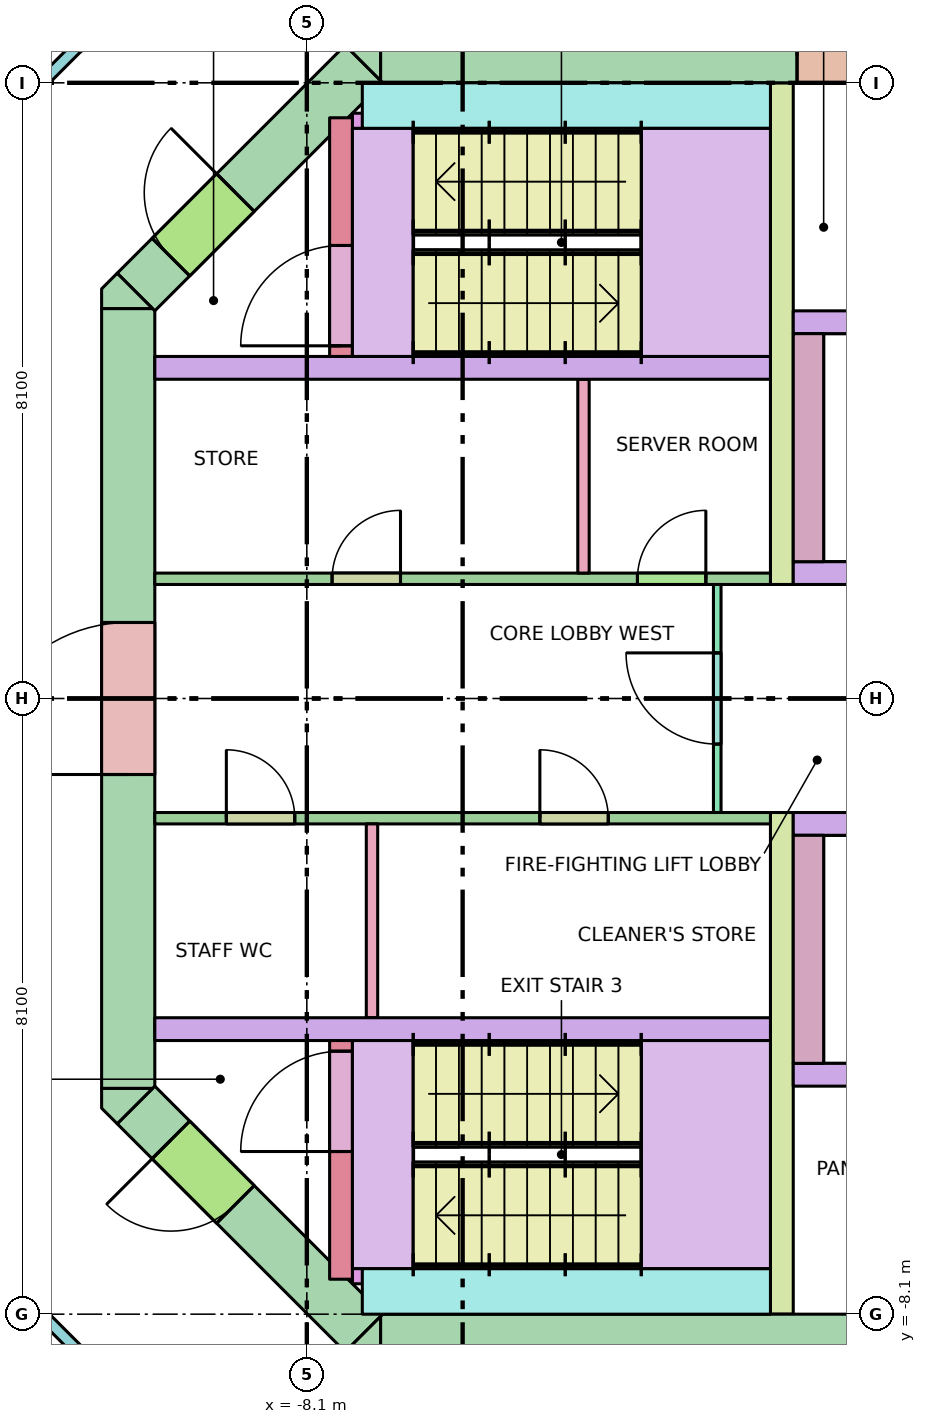
"""IFC4 building model, lengths in metres.
Left out: names, types, materials, properties, quantities, classifications, styles, units other than length and angle.
Written with IfcOpenShell. Run it as: python <this file> out.ifc"""

import sys

from ifc_helpers import new_model, si_unit, direction, frame, frame_2d, origin, place, context, subcontext, project, spatial, polyline, rectangle, outline, extrude, element, fill, save


model = new_model("IFC4")
c1 = context("Model", 3, precision=1e-05, world=origin(), true_north=direction((0.0, 1.0)))
c2 = subcontext(c1, "Body", "Model", "MODEL_VIEW")
j1 = project(units=[si_unit("LENGTHUNIT", "METRE"), si_unit("PLANEANGLEUNIT", "RADIAN")], contexts=[c1])
p1 = place(None, origin())
s1 = spatial("IfcSite", under=j1, at=p1, CompositionType="ELEMENT")
p2 = place(p1, origin())
s2 = spatial("IfcBuilding", under=s1, at=p2, CompositionType="ELEMENT")
p3 = place(p2, frame((0.0, 0.0, 218.7)))
s3 = spatial("IfcBuildingStorey", under=s2, at=p3, CompositionType="ELEMENT", Elevation=218.7)
p4 = place(p3, frame((-7.13, 8.45, -0.28), z_axis=(0.0, 0.0, 1.0), x_axis=(1.0, 0.0, 0.0)))
e1 = element("IfcWall", 1, at=p4, inside=s3, PredefinedType="SHEAR", context=c2, shape_type="SweptSolid", body=[
    extrude(rectangle(XDim=14.26, YDim=0.7, at=frame_2d((7.13, 0.0))), origin(), (0.0, 0.0, 1.0), 7.4),
])
p5 = place(p4, frame((5.48, 0.0, 0.28)))
e2 = element("IfcOpeningElement", 2, at=p5, cuts=e1, PredefinedType="OPENING", context=c2, shape_type="SweptSolid", body=[
    extrude(rectangle(XDim=0.7, YDim=2.1, at=frame_2d((0.35, 1.05))), frame((0.0, 0.36, 0.0), z_axis=(0.0, -1.0, 0.0), x_axis=(1.0, 0.0, 0.0)), (0.0, 0.0, 1.0), 0.72),
])
p6 = place(p4, frame((7.155, 0.0, 0.28)))
e3 = element("IfcOpeningElement", 3, at=p6, cuts=e1, PredefinedType="OPENING", context=c2, shape_type="SweptSolid", body=[
    extrude(rectangle(XDim=0.9, YDim=2.1, at=frame_2d((0.45, 1.05))), frame((0.0, 0.36, 0.0), z_axis=(0.0, -1.0, 0.0), x_axis=(1.0, 0.0, 0.0)), (0.0, 0.0, 1.0), 0.72),
])
p7 = place(p3, frame((-7.13, -8.45, -0.28), z_axis=(0.0, 0.0, 1.0), x_axis=(1.0, 0.0, 0.0)))
e4 = element("IfcWall", 4, at=p7, inside=s3, PredefinedType="SHEAR", context=c2, shape_type="SweptSolid", body=[
    extrude(rectangle(XDim=14.26, YDim=0.7, at=frame_2d((7.13, 0.0))), origin(), (0.0, 0.0, 1.0), 7.4),
])
p8 = place(p7, frame((8.08, 0.0, 0.28)))
e5 = element("IfcOpeningElement", 5, at=p8, cuts=e4, PredefinedType="OPENING", context=c2, shape_type="SweptSolid", body=[
    extrude(rectangle(XDim=0.7, YDim=2.1, at=frame_2d((0.35, 1.05))), frame((0.0, 0.36, 0.0), z_axis=(0.0, -1.0, 0.0), x_axis=(1.0, 0.0, 0.0)), (0.0, 0.0, 1.0), 0.72),
])
p9 = place(p7, frame((6.205, 0.0, 0.28)))
e6 = element("IfcOpeningElement", 6, at=p9, cuts=e4, PredefinedType="OPENING", context=c2, shape_type="SweptSolid", body=[
    extrude(rectangle(XDim=0.9, YDim=2.1, at=frame_2d((0.45, 1.05))), frame((0.0, 0.36, 0.0), z_axis=(0.0, -1.0, 0.0), x_axis=(1.0, 0.0, 0.0)), (0.0, 0.0, 1.0), 0.72),
])
p10 = place(p7, frame((10.667, 0.0, 0.28)))
e7 = element("IfcOpeningElement", 7, at=p10, cuts=e4, PredefinedType="OPENING", context=c2, shape_type="SweptSolid", body=[
    extrude(rectangle(XDim=0.9, YDim=2.1, at=frame_2d((0.45, 1.05))), frame((0.0, 0.36, 0.0), z_axis=(0.0, -1.0, 0.0), x_axis=(1.0, 0.0, 0.0)), (0.0, 0.0, 1.0), 0.72),
])
p11 = place(p3, frame((-10.45, -5.13, -0.28), z_axis=(0.0, 0.0, 1.0), x_axis=(0.0, 1.0, 0.0)))
e8 = element("IfcWall", 8, at=p11, inside=s3, PredefinedType="SHEAR", context=c2, shape_type="SweptSolid", body=[
    extrude(rectangle(XDim=10.26, YDim=0.7, at=frame_2d((5.13, 0.0))), origin(), (0.0, 0.0, 1.0), 7.4),
])
p12 = place(p11, frame((4.13, 0.0, 0.28)))
e9 = element("IfcOpeningElement", 9, at=p12, cuts=e8, PredefinedType="OPENING", context=c2, shape_type="SweptSolid", body=[
    extrude(rectangle(XDim=2.0, YDim=2.1, at=frame_2d((1.0, 1.05))), frame((0.0, 0.36, 0.0), z_axis=(0.0, -1.0, 0.0), x_axis=(1.0, 0.0, 0.0)), (0.0, 0.0, 1.0), 0.72),
])
p13 = place(p3, frame((-10.347, 5.347, -0.28), z_axis=(0.0, 0.0, 1.0), x_axis=(0.707106781187, 0.707106781187, 0.0)))
e10 = element("IfcWall", 10, at=p13, inside=s3, PredefinedType="SHEAR", context=c2, shape_type="SweptSolid", body=[
    extrude(rectangle(XDim=4.243, YDim=0.7, at=frame_2d((2.121, 0.0))), origin(), (0.0, 0.0, 1.0), 7.4),
])
p14 = place(p13, frame((0.65, 0.0, 0.28)))
e11 = element("IfcOpeningElement", 11, at=p14, cuts=e10, PredefinedType="OPENING", context=c2, shape_type="SweptSolid", body=[
    extrude(rectangle(XDim=1.2, YDim=2.1, at=frame_2d((0.6, 1.05))), frame((0.0, 0.36, 0.0), z_axis=(0.0, -1.0, 0.0), x_axis=(1.0, 0.0, 0.0)), (0.0, 0.0, 1.0), 0.72),
])
p15 = place(p3, frame((-7.347, -8.347, -0.28), z_axis=(0.0, 0.0, 1.0), x_axis=(-0.707106781187, 0.707106781187, 0.0)))
e12 = element("IfcWall", 12, at=p15, inside=s3, PredefinedType="SHEAR", context=c2, shape_type="SweptSolid", body=[
    extrude(rectangle(XDim=4.243, YDim=0.7, at=frame_2d((2.121, 0.0))), origin(), (0.0, 0.0, 1.0), 7.4),
])
p16 = place(p15, frame((2.393, 0.0, 0.28)))
e13 = element("IfcOpeningElement", 13, at=p16, cuts=e12, PredefinedType="OPENING", context=c2, shape_type="SweptSolid", body=[
    extrude(rectangle(XDim=1.2, YDim=2.1, at=frame_2d((0.6, 1.05))), frame((0.0, 0.36, 0.0), z_axis=(0.0, -1.0, 0.0), x_axis=(1.0, 0.0, 0.0)), (0.0, 0.0, 1.0), 0.72),
])
p17 = place(p3, frame((0.0, 0.0, -0.28)))
e14 = element("IfcWall", 14, at=p17, inside=s3, PredefinedType="SHEAR", context=c2, shape_type="SweptSolid", body=[
    extrude(outline(polyline([(-7.39, -8.8), (-7.595, -8.595), (-7.595, -8.595), (-7.595, -8.595), (-7.13, -8.13), (-7.13, -8.8), (-7.13, -8.8), (-7.39, -8.8)])), origin(), (0.0, 0.0, 1.0), 7.4),
])
p18 = place(p3, frame((0.0, 0.0, -0.28)))
e15 = element("IfcWall", 15, at=p18, inside=s3, PredefinedType="SHEAR", context=c2, shape_type="SweptSolid", body=[
    extrude(outline(polyline([(-10.8, -5.39), (-10.8, -5.13), (-10.8, -5.13), (-10.13, -5.13), (-10.595, -5.595), (-10.595, -5.595), (-10.595, -5.595), (-10.8, -5.39)])), origin(), (0.0, 0.0, 1.0), 7.4),
])
p19 = place(p3, frame((0.0, 0.0, -0.28)))
e16 = element("IfcWall", 16, at=p19, inside=s3, PredefinedType="SHEAR", context=c2, shape_type="SweptSolid", body=[
    extrude(outline(polyline([(-10.595, 5.595), (-10.595, 5.595), (-10.595, 5.595), (-10.13, 5.13), (-10.8, 5.13), (-10.8, 5.13), (-10.8, 5.39), (-10.595, 5.595)])), origin(), (0.0, 0.0, 1.0), 7.4),
])
p20 = place(p3, frame((0.0, 0.0, -0.28)))
e17 = element("IfcWall", 17, at=p20, inside=s3, PredefinedType="SHEAR", context=c2, shape_type="SweptSolid", body=[
    extrude(outline(polyline([(-7.39, 8.8), (-7.13, 8.8), (-7.13, 8.8), (-7.13, 8.13), (-7.595, 8.595), (-7.595, 8.595), (-7.595, 8.595), (-7.39, 8.8)])), origin(), (0.0, 0.0, 1.0), 7.4),
])
for number, where, z_axis, x_axis in (
    (18, (-10.1, 4.35, 0.0), (0.0, 0.0, 1.0), (1.0, 0.0, 0.0)),
    (19, (-10.1, -4.35, 0.0), (0.0, 0.0, 1.0), (1.0, 0.0, 0.0)),
):
    element("IfcWall", number, at=place(p3, frame(where, z_axis=z_axis, x_axis=x_axis)), inside=s3, PredefinedType="SOLIDWALL", context=c2, shape_type="SweptSolid", body=[
        extrude(rectangle(XDim=8.1, YDim=0.3, at=frame_2d((4.05, 0.0))), origin(), (0.0, 0.0, 1.0), 7.12),
    ])
for number, where, z_axis, x_axis in (
    (20, (-1.85, 1.5, 0.0), (0.0, 0.0, 1.0), (0.0, 1.0, 0.0)),
    (21, (-1.85, -8.1, 0.0), (0.0, 0.0, 1.0), (0.0, 1.0, 0.0)),
):
    element("IfcWall", number, at=place(p3, frame(where, z_axis=z_axis, x_axis=x_axis)), inside=s3, PredefinedType="SHEAR", context=c2, shape_type="SweptSolid", body=[
        extrude(rectangle(XDim=6.6, YDim=0.3, at=frame_2d((3.3, 0.0))), origin(), (0.0, 0.0, 1.0), 7.12),
    ])
p21 = place(p3, frame((-1.7, 1.65, 0.0), z_axis=(0.0, 0.0, 1.0), x_axis=(1.0, 0.0, 0.0)))
e22 = element("IfcWall", 22, at=p21, inside=s3, PredefinedType="SOLIDWALL", context=c2, shape_type="SweptSolid", body=[
    extrude(rectangle(XDim=3.4, YDim=0.3, at=frame_2d((1.7, 0.0))), origin(), (0.0, 0.0, 1.0), 7.12),
])
p22 = place(p21, frame((1.15, 0.0, 0.0)))
e23 = element("IfcOpeningElement", 23, at=p22, cuts=e22, PredefinedType="OPENING", context=c2, shape_type="SweptSolid", body=[
    extrude(rectangle(XDim=1.1, YDim=2.1, at=frame_2d((0.55, 1.05))), frame((0.0, 0.16, 0.0), z_axis=(0.0, -1.0, 0.0), x_axis=(1.0, 0.0, 0.0)), (0.0, 0.0, 1.0), 0.32),
])
p23 = place(p3, frame((-1.7, -1.65, 0.0), z_axis=(0.0, 0.0, 1.0), x_axis=(1.0, 0.0, 0.0)))
e24 = element("IfcWall", 24, at=p23, inside=s3, PredefinedType="SOLIDWALL", context=c2, shape_type="SweptSolid", body=[
    extrude(rectangle(XDim=3.4, YDim=0.3, at=frame_2d((1.7, 0.0))), origin(), (0.0, 0.0, 1.0), 7.12),
])
p24 = place(p23, frame((1.15, 0.0, 0.0)))
e25 = element("IfcOpeningElement", 25, at=p24, cuts=e24, PredefinedType="OPENING", context=c2, shape_type="SweptSolid", body=[
    extrude(rectangle(XDim=1.1, YDim=2.1, at=frame_2d((0.55, 1.05))), frame((0.0, 0.16, 0.0), z_axis=(0.0, -1.0, 0.0), x_axis=(1.0, 0.0, 0.0)), (0.0, 0.0, 1.0), 0.32),
])
for number, where, z_axis, x_axis in (
    (26, (-1.5, 1.8, 0.0), (0.0, 0.0, 1.0), (0.0, 1.0, 0.0)),
    (27, (-1.5, -4.8, 0.0), (0.0, 0.0, 1.0), (0.0, 1.0, 0.0)),
):
    element("IfcWall", number, at=place(p3, frame(where, z_axis=z_axis, x_axis=x_axis)), inside=s3, PredefinedType="SOLIDWALL", context=c2, shape_type="SweptSolid", body=[
        extrude(rectangle(XDim=3.0, YDim=0.4, at=frame_2d((1.5, 0.0))), origin(), (0.0, 0.0, 1.0), 7.12),
    ])
for number, where, z_axis, x_axis in (
    (28, (-1.7, 4.95, 0.0), (0.0, 0.0, 1.0), (1.0, 0.0, 0.0)),
    (29, (-1.7, -4.95, 0.0), (0.0, 0.0, 1.0), (1.0, 0.0, 0.0)),
):
    element("IfcWall", number, at=place(p3, frame(where, z_axis=z_axis, x_axis=x_axis)), inside=s3, PredefinedType="SOLIDWALL", context=c2, shape_type="SweptSolid", body=[
        extrude(rectangle(XDim=3.4, YDim=0.3, at=frame_2d((1.7, 0.0))), origin(), (0.0, 0.0, 1.0), 7.12),
    ])
p25 = place(p3, frame((-7.65, 4.5, 0.0), z_axis=(0.0, 0.0, 1.0), x_axis=(0.0, 1.0, 0.0)))
e30 = element("IfcWall", 30, at=p25, inside=s3, PredefinedType="SHEAR", context=c2, shape_type="SweptSolid", body=[
    extrude(rectangle(XDim=3.14, YDim=0.3, at=frame_2d((1.57, 0.0))), origin(), (0.0, 0.0, 1.0), 7.12),
])
p26 = place(p25, frame((0.14, 0.0, 0.0)))
e31 = element("IfcOpeningElement", 31, at=p26, cuts=e30, PredefinedType="OPENING", context=c2, shape_type="SweptSolid", body=[
    extrude(rectangle(XDim=1.32, YDim=2.1, at=frame_2d((0.66, 1.05))), frame((0.0, 0.16, 0.0), z_axis=(0.0, -1.0, 0.0), x_axis=(1.0, 0.0, 0.0)), (0.0, 0.0, 1.0), 0.32),
])
p27 = place(p3, frame((-7.37, 7.8, 0.0), z_axis=(0.0, 0.0, 1.0), x_axis=(1.0, 0.0, 0.0)))
e32 = element("IfcWall", 32, at=p27, inside=s3, PredefinedType="SHEAR", context=c2, shape_type="SweptSolid", body=[
    extrude(rectangle(XDim=5.37, YDim=0.6, at=frame_2d((2.685, 0.0))), origin(), (0.0, 0.0, 1.0), 7.12),
])
p28 = place(p3, frame((-7.65, -7.64, 0.0), z_axis=(0.0, 0.0, 1.0), x_axis=(0.0, 1.0, 0.0)))
e33 = element("IfcWall", 33, at=p28, inside=s3, PredefinedType="SHEAR", context=c2, shape_type="SweptSolid", body=[
    extrude(rectangle(XDim=3.14, YDim=0.3, at=frame_2d((1.57, 0.0))), origin(), (0.0, 0.0, 1.0), 7.12),
])
p29 = place(p28, frame((1.68, 0.0, 0.0)))
e34 = element("IfcOpeningElement", 34, at=p29, cuts=e33, PredefinedType="OPENING", context=c2, shape_type="SweptSolid", body=[
    extrude(rectangle(XDim=1.32, YDim=2.1, at=frame_2d((0.66, 1.05))), frame((0.0, 0.16, 0.0), z_axis=(0.0, -1.0, 0.0), x_axis=(1.0, 0.0, 0.0)), (0.0, 0.0, 1.0), 0.32),
])
for number, where, z_axis, x_axis in (
    (35, (-7.5, 7.6, 0.0), (0.0, 0.0, 1.0), (1.0, 0.0, 0.0)),
    (36, (-7.5, -7.6, 0.0), (0.0, 0.0, 1.0), (1.0, 0.0, 0.0)),
):
    element("IfcWall", number, at=place(p3, frame(where, z_axis=z_axis, x_axis=x_axis)), inside=s3, PredefinedType="SHEAR", context=c2, shape_type="SweptSolid", body=[
        extrude(rectangle(XDim=0.6, YDim=0.2, at=frame_2d((0.3, 0.0))), origin(), (0.0, 0.0, 1.0), 7.12),
    ])
p30 = place(p3, frame((-7.37, -7.8, 0.0), z_axis=(0.0, 0.0, 1.0), x_axis=(1.0, 0.0, 0.0)))
e37 = element("IfcWall", 37, at=p30, inside=s3, PredefinedType="SHEAR", context=c2, shape_type="SweptSolid", body=[
    extrude(rectangle(XDim=5.37, YDim=0.6, at=frame_2d((2.685, 0.0))), origin(), (0.0, 0.0, 1.0), 7.12),
])
p31 = place(p3, frame((-2.7, -1.5, 0.0), z_axis=(0.0, 0.0, 1.0), x_axis=(0.0, 1.0, 0.0)))
e38 = element("IfcWall", 38, at=p31, inside=s3, PredefinedType="PARTITIONING", context=c2, shape_type="SweptSolid", body=[
    extrude(rectangle(XDim=3.0, YDim=0.1, at=frame_2d((1.5, 0.0))), origin(), (0.0, 0.0, 1.0), 7.12),
])
p32 = place(p31, frame((0.9, 0.0, 0.0)))
e39 = element("IfcOpeningElement", 39, at=p32, cuts=e38, PredefinedType="OPENING", context=c2, shape_type="SweptSolid", body=[
    extrude(rectangle(XDim=1.2, YDim=2.1, at=frame_2d((0.6, 1.05))), frame((0.0, 0.06, 0.0), z_axis=(0.0, -1.0, 0.0), x_axis=(1.0, 0.0, 0.0)), (0.0, 0.0, 1.0), 0.12),
])
for number, where, z_axis, x_axis in (
    (40, (-4.46, 1.65, 0.0), (0.0, 0.0, 1.0), (0.0, 1.0, 0.0)),
    (41, (-7.242, -4.2, 0.0), (0.0, 0.0, 1.0), (0.0, 1.0, 0.0)),
):
    element("IfcWall", number, at=place(p3, frame(where, z_axis=z_axis, x_axis=x_axis)), inside=s3, PredefinedType="PARTITIONING", context=c2, shape_type="SweptSolid", body=[
        extrude(rectangle(XDim=2.55, YDim=0.15, at=frame_2d((1.275, 0.0))), origin(), (0.0, 0.0, 1.0), 7.12),
    ])
p33 = place(p3, frame((-10.1, 1.575, 0.0), z_axis=(0.0, 0.0, 1.0), x_axis=(1.0, 0.0, 0.0)))
e42 = element("IfcWall", 42, at=p33, inside=s3, PredefinedType="PARTITIONING", context=c2, shape_type="SweptSolid", body=[
    extrude(rectangle(XDim=8.1, YDim=0.15, at=frame_2d((4.05, 0.0))), origin(), (0.0, 0.0, 1.0), 7.12),
])
p34 = place(p33, frame((2.333, 0.0, 0.0)))
e43 = element("IfcOpeningElement", 43, at=p34, cuts=e42, PredefinedType="OPENING", context=c2, shape_type="SweptSolid", body=[
    extrude(rectangle(XDim=0.9, YDim=2.1, at=frame_2d((0.45, 1.05))), frame((0.0, 0.085, 0.0), z_axis=(0.0, -1.0, 0.0), x_axis=(1.0, 0.0, 0.0)), (0.0, 0.0, 1.0), 0.17),
])
p35 = place(p33, frame((6.35, 0.0, 0.0)))
e44 = element("IfcOpeningElement", 44, at=p35, cuts=e42, PredefinedType="OPENING", context=c2, shape_type="SweptSolid", body=[
    extrude(rectangle(XDim=0.9, YDim=2.1, at=frame_2d((0.45, 1.05))), frame((0.0, 0.085, 0.0), z_axis=(0.0, -1.0, 0.0), x_axis=(1.0, 0.0, 0.0)), (0.0, 0.0, 1.0), 0.17),
])
p36 = place(p3, frame((-10.1, -1.575, 0.0), z_axis=(0.0, 0.0, 1.0), x_axis=(1.0, 0.0, 0.0)))
e45 = element("IfcWall", 45, at=p36, inside=s3, PredefinedType="PARTITIONING", context=c2, shape_type="SweptSolid", body=[
    extrude(rectangle(XDim=8.1, YDim=0.15, at=frame_2d((4.05, 0.0))), origin(), (0.0, 0.0, 1.0), 7.12),
])
p37 = place(p36, frame((0.941, 0.0, 0.0)))
e46 = element("IfcOpeningElement", 46, at=p37, cuts=e45, PredefinedType="OPENING", context=c2, shape_type="SweptSolid", body=[
    extrude(rectangle(XDim=0.9, YDim=2.1, at=frame_2d((0.45, 1.05))), frame((0.0, 0.085, 0.0), z_axis=(0.0, -1.0, 0.0), x_axis=(1.0, 0.0, 0.0)), (0.0, 0.0, 1.0), 0.17),
])
p38 = place(p36, frame((5.066, 0.0, 0.0)))
e47 = element("IfcOpeningElement", 47, at=p38, cuts=e45, PredefinedType="OPENING", context=c2, shape_type="SweptSolid", body=[
    extrude(rectangle(XDim=0.9, YDim=2.1, at=frame_2d((0.45, 1.05))), frame((0.0, 0.085, 0.0), z_axis=(0.0, -1.0, 0.0), x_axis=(1.0, 0.0, 0.0)), (0.0, 0.0, 1.0), 0.17),
])
p39 = place(p3, frame((-8.452, -11.238, 0.0), z_axis=(0.0, 0.0, 1.0), x_axis=(-0.707106781187, 0.707106781187, 0.0)))
e48 = element("IfcWall", 48, at=p39, inside=s3, PredefinedType="PARTITIONING", context=c2, shape_type="SweptSolid", body=[
    extrude(rectangle(XDim=6.768, YDim=0.15, at=frame_2d((3.384, 0.0))), origin(), (0.0, 0.0, 1.0), 6.27),
])
p40 = place(p3, frame((-13.238, 6.452, 0.0), z_axis=(0.0, 0.0, 1.0), x_axis=(0.707106781187, 0.707106781187, 0.0)))
e49 = element("IfcWall", 49, at=p40, inside=s3, PredefinedType="PARTITIONING", context=c2, shape_type="SweptSolid", body=[
    extrude(rectangle(XDim=6.768, YDim=0.15, at=frame_2d((3.384, 0.0))), origin(), (0.0, 0.0, 1.0), 6.27),
])
p41 = place(p40, frame((2.992, 0.0, 0.0)))
e50 = element("IfcOpeningElement", 50, at=p41, cuts=e49, PredefinedType="OPENING", context=c2, shape_type="SweptSolid", body=[
    extrude(rectangle(XDim=1.8, YDim=2.1, at=frame_2d((0.9, 1.05))), frame((0.0, 0.085, 0.0), z_axis=(0.0, -1.0, 0.0), x_axis=(1.0, 0.0, 0.0)), (0.0, 0.0, 1.0), 0.17),
])
p42 = place(p26, origin())
e51 = element("IfcDoor", 51, at=p42, inside=s3, OperationType="DOUBLE_DOOR_SINGLE_SWING", PredefinedType="DOOR", context=c2, shape_type="SweptSolid", body=[
    extrude(rectangle(XDim=1.32, YDim=2.1, at=frame_2d((0.66, 1.05))), frame((0.0, 0.025, 0.0), z_axis=(0.0, -1.0, 0.0), x_axis=(1.0, 0.0, 0.0)), (0.0, 0.0, 1.0), 0.05),
])
fill(e31, e51)
p43 = place(p14, origin())
e52 = element("IfcDoor", 52, at=p43, inside=s3, OperationType="SINGLE_SWING_RIGHT", PredefinedType="DOOR", context=c2, shape_type="SweptSolid", body=[
    extrude(rectangle(XDim=1.2, YDim=2.1, at=frame_2d((0.6, 1.05))), frame((0.0, 0.025, 0.0), z_axis=(0.0, -1.0, 0.0), x_axis=(1.0, 0.0, 0.0)), (0.0, 0.0, 1.0), 0.05),
])
fill(e11, e52)
p44 = place(p29, origin())
e53 = element("IfcDoor", 53, at=p44, inside=s3, OperationType="DOUBLE_DOOR_SINGLE_SWING", PredefinedType="DOOR", context=c2, shape_type="SweptSolid", body=[
    extrude(rectangle(XDim=1.32, YDim=2.1, at=frame_2d((0.66, 1.05))), frame((0.0, 0.025, 0.0), z_axis=(0.0, -1.0, 0.0), x_axis=(1.0, 0.0, 0.0)), (0.0, 0.0, 1.0), 0.05),
])
fill(e34, e53)
p45 = place(p16, origin())
e54 = element("IfcDoor", 54, at=p45, inside=s3, OperationType="SINGLE_SWING_RIGHT", PredefinedType="DOOR", context=c2, shape_type="SweptSolid", body=[
    extrude(rectangle(XDim=1.2, YDim=2.1, at=frame_2d((0.6, 1.05))), frame((0.0, 0.025, 0.0), z_axis=(0.0, -1.0, 0.0), x_axis=(1.0, 0.0, 0.0)), (0.0, 0.0, 1.0), 0.05),
])
fill(e13, e54)
p46 = place(p12, origin())
e55 = element("IfcDoor", 55, at=p46, inside=s3, OperationType="DOUBLE_DOOR_SINGLE_SWING", PredefinedType="DOOR", context=c2, shape_type="SweptSolid", body=[
    extrude(rectangle(XDim=2.0, YDim=2.1, at=frame_2d((1.0, 1.05))), frame((0.0, 0.025, 0.0), z_axis=(0.0, -1.0, 0.0), x_axis=(1.0, 0.0, 0.0)), (0.0, 0.0, 1.0), 0.05),
])
fill(e9, e55)
p47 = place(p32, origin())
e56 = element("IfcDoor", 56, at=p47, inside=s3, OperationType="SINGLE_SWING_RIGHT", PredefinedType="DOOR", context=c2, shape_type="SweptSolid", body=[
    extrude(rectangle(XDim=1.2, YDim=2.1, at=frame_2d((0.6, 1.05))), frame((0.0, 0.025, 0.0), z_axis=(0.0, -1.0, 0.0), x_axis=(1.0, 0.0, 0.0)), (0.0, 0.0, 1.0), 0.05),
])
fill(e39, e56)
p48 = place(p5, origin())
e57 = element("IfcDoor", 57, at=p48, inside=s3, OperationType="SINGLE_SWING_LEFT", PredefinedType="DOOR", context=c2, shape_type="SweptSolid", body=[
    extrude(rectangle(XDim=0.7, YDim=2.1, at=frame_2d((0.35, 1.05))), frame((0.0, 0.025, 0.0), z_axis=(0.0, -1.0, 0.0), x_axis=(1.0, 0.0, 0.0)), (0.0, 0.0, 1.0), 0.05),
])
fill(e2, e57)
p49 = place(p34, origin())
e58 = element("IfcDoor", 58, at=p49, inside=s3, OperationType="SINGLE_SWING_RIGHT", PredefinedType="DOOR", context=c2, shape_type="SweptSolid", body=[
    extrude(rectangle(XDim=0.9, YDim=2.1, at=frame_2d((0.45, 1.05))), frame((0.0, 0.025, 0.0), z_axis=(0.0, -1.0, 0.0), x_axis=(1.0, 0.0, 0.0)), (0.0, 0.0, 1.0), 0.05),
])
fill(e43, e58)
p50 = place(p35, origin())
e59 = element("IfcDoor", 59, at=p50, inside=s3, OperationType="SINGLE_SWING_RIGHT", PredefinedType="DOOR", context=c2, shape_type="SweptSolid", body=[
    extrude(rectangle(XDim=0.9, YDim=2.1, at=frame_2d((0.45, 1.05))), frame((0.0, 0.025, 0.0), z_axis=(0.0, -1.0, 0.0), x_axis=(1.0, 0.0, 0.0)), (0.0, 0.0, 1.0), 0.05),
])
fill(e44, e59)
p51 = place(p37, origin())
e60 = element("IfcDoor", 60, at=p51, inside=s3, OperationType="SINGLE_SWING_LEFT", PredefinedType="DOOR", context=c2, shape_type="SweptSolid", body=[
    extrude(rectangle(XDim=0.9, YDim=2.1, at=frame_2d((0.45, 1.05))), frame((0.0, 0.025, 0.0), z_axis=(0.0, -1.0, 0.0), x_axis=(1.0, 0.0, 0.0)), (0.0, 0.0, 1.0), 0.05),
])
fill(e46, e60)
p52 = place(p38, origin())
e61 = element("IfcDoor", 61, at=p52, inside=s3, OperationType="SINGLE_SWING_LEFT", PredefinedType="DOOR", context=c2, shape_type="SweptSolid", body=[
    extrude(rectangle(XDim=0.9, YDim=2.1, at=frame_2d((0.45, 1.05))), frame((0.0, 0.025, 0.0), z_axis=(0.0, -1.0, 0.0), x_axis=(1.0, 0.0, 0.0)), (0.0, 0.0, 1.0), 0.05),
])
fill(e47, e61)
save(model, sys.argv[1])
